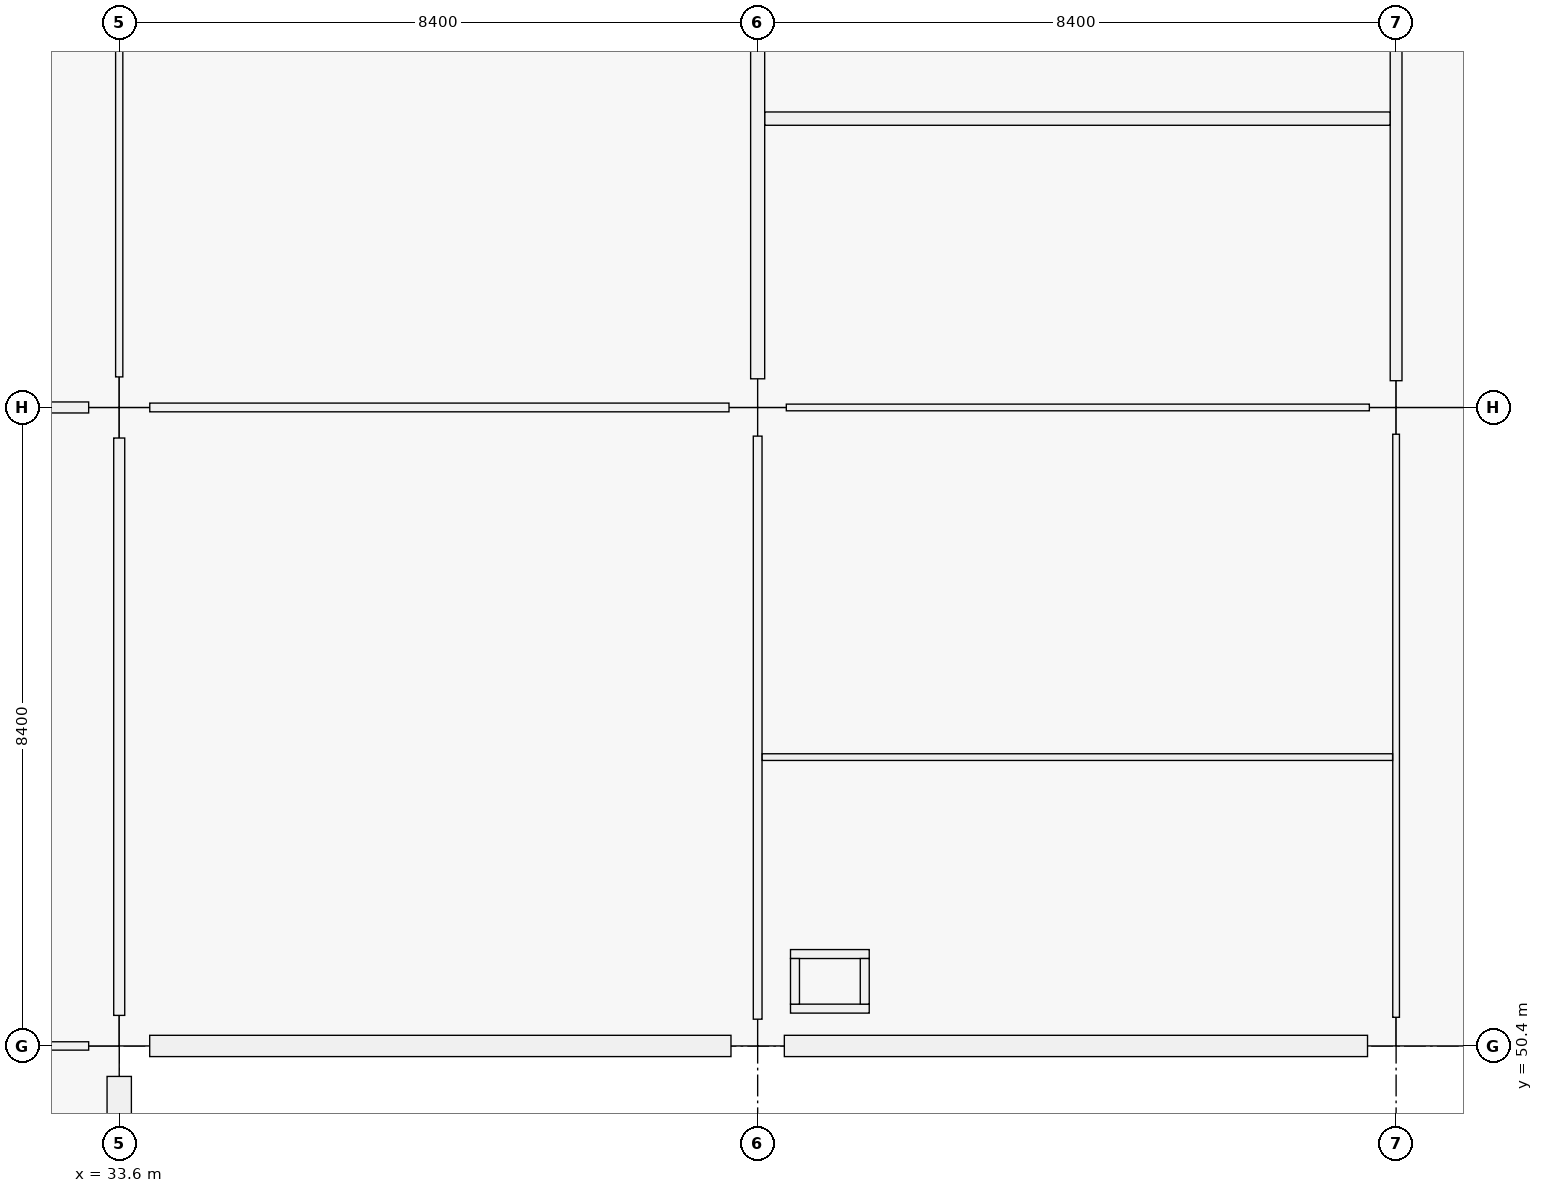
"""IFC4 building model, lengths in metres.
Left out: names, types, materials, properties, quantities, classifications, styles, units other than length and angle.
Written with IfcOpenShell. Run it as: python <this file> out.ifc"""

import sys

from ifc_helpers import new_model, si_unit, direction, frame, frame_2d, origin, origin_2d, place, context, subcontext, project, spatial, rectangle, extrude, element, fill, save


model = new_model("IFC4")
c1 = context("Model", 3, precision=1e-05, world=origin(), true_north=direction((0.0, 1.0)))
c2 = subcontext(c1, "Body", "Model", "MODEL_VIEW")
j1 = project(units=[si_unit("LENGTHUNIT", "METRE"), si_unit("PLANEANGLEUNIT", "RADIAN")], contexts=[c1])
p1 = place(None, origin())
s1 = spatial("IfcSite", under=j1, at=p1, CompositionType="ELEMENT")
p2 = place(p1, origin())
s2 = spatial("IfcBuilding", under=s1, at=p2, CompositionType="ELEMENT")
p3 = place(p2, frame((0.0, 0.0, 5.76)))
s3 = spatial("IfcBuildingStorey", under=s2, at=p3, CompositionType="ELEMENT", Elevation=5.76)
for number, where, z_axis, x_axis in (
    (1, (33.6, 50.4, 0.0), (0.0, 0.0, 1.0), (1.0, 0.0, 0.0)),
    (2, (33.6, 58.8, 0.0), (0.0, 0.0, 1.0), (1.0, 0.0, 0.0)),
):
    element("IfcColumn", number, at=place(p3, frame(where, z_axis=z_axis, x_axis=x_axis)), inside=s3, PredefinedType="COLUMN", context=c2, shape_type="SweptSolid", body=[
        extrude(rectangle(XDim=0.8, YDim=0.8, at=origin_2d()), origin(), (0.0, 0.0, 1.0), 4.5),
    ])
p4 = place(p3, frame((42.0, 50.4, 0.0), z_axis=(0.0, 0.0, 1.0), x_axis=(1.0, 0.0, 0.0)))
e3 = element("IfcColumn", 3, at=p4, inside=s3, PredefinedType="COLUMN", context=c2, shape_type="SweptSolid", body=[
    extrude(rectangle(XDim=0.7, YDim=0.7, at=origin_2d()), origin(), (0.0, 0.0, 1.0), 4.5),
])
for number, where, z_axis, x_axis in (
    (4, (42.0, 58.8, 0.0), (0.0, 0.0, 1.0), (1.0, 0.0, 0.0)),
    (5, (50.4, 50.4, 0.0), (0.0, 0.0, 1.0), (1.0, 0.0, 0.0)),
):
    element("IfcColumn", number, at=place(p3, frame(where, z_axis=z_axis, x_axis=x_axis)), inside=s3, PredefinedType="COLUMN", context=c2, shape_type="SweptSolid", body=[
        extrude(rectangle(XDim=0.75, YDim=0.75, at=origin_2d()), origin(), (0.0, 0.0, 1.0), 4.5),
    ])
p5 = place(p3, frame((50.4, 58.8, 0.0), z_axis=(0.0, 0.0, 1.0), x_axis=(1.0, 0.0, 0.0)))
e6 = element("IfcColumn", 6, at=p5, inside=s3, PredefinedType="COLUMN", context=c2, shape_type="SweptSolid", body=[
    extrude(rectangle(XDim=0.7, YDim=0.7, at=origin_2d()), origin(), (0.0, 0.0, 1.0), 4.5),
])
p6 = place(p3, frame((33.6, 49.999, 0.0), z_axis=(0.0, 0.0, 1.0), x_axis=(0.0, -1.0, 0.0)))
e7 = element("IfcWall", 7, at=p6, inside=s3, PredefinedType="SOLIDWALL", context=c2, shape_type="SweptSolid", body=[
    extrude(rectangle(XDim=7.598, YDim=0.32, at=frame_2d((3.799, 0.0))), origin(), (0.0, 0.0, 1.0), 3.4),
])
p7 = place(p6, frame((2.924, 0.0, 0.9)))
e8 = element("IfcOpeningElement", 8, at=p7, cuts=e7, PredefinedType="OPENING", context=c2, shape_type="SweptSolid", body=[
    extrude(rectangle(XDim=1.75, YDim=1.95, at=frame_2d((0.875, 0.975))), frame((0.0, 0.16, 0.0), z_axis=(0.0, -1.0, 0.0), x_axis=(1.0, 0.0, 0.0)), (0.0, 0.0, 1.0), 0.32),
])
p8 = place(p3, frame((41.649, 50.4, 0.0), z_axis=(0.0, 0.0, 1.0), x_axis=(-1.0, 0.0, 0.0)))
e9 = element("IfcWall", 9, at=p8, inside=s3, PredefinedType="SOLIDWALL", context=c2, shape_type="SweptSolid", body=[
    extrude(rectangle(XDim=7.648, YDim=0.28, at=frame_2d((3.824, 0.0))), origin(), (0.0, 0.0, 1.0), 3.4),
])
p9 = place(p3, frame((50.024, 50.4, 0.0), z_axis=(0.0, 0.0, 1.0), x_axis=(-1.0, 0.0, 0.0)))
e10 = element("IfcWall", 10, at=p9, inside=s3, PredefinedType="SOLIDWALL", context=c2, shape_type="SweptSolid", body=[
    extrude(rectangle(XDim=7.673, YDim=0.28, at=frame_2d((3.836, 0.0))), origin(), (0.0, 0.0, 1.0), 3.4),
])
p10 = place(p9, frame((2.462, 0.0, 0.9)))
e11 = element("IfcOpeningElement", 11, at=p10, cuts=e10, PredefinedType="OPENING", context=c2, shape_type="SweptSolid", body=[
    extrude(rectangle(XDim=2.75, YDim=1.6, at=frame_2d((1.375, 0.8))), frame((0.0, 0.14, 0.0), z_axis=(0.0, -1.0, 0.0), x_axis=(1.0, 0.0, 0.0)), (0.0, 0.0, 1.0), 0.28),
])
for number, where, z_axis, x_axis in (
    (12, (42.432, 50.891, 0.0), (0.0, 0.0, 1.0), (1.0, 0.0, 0.0)),
    (13, (42.432, 51.609, 0.0), (0.0, 0.0, 1.0), (1.0, 0.0, 0.0)),
):
    element("IfcWall", number, at=place(p3, frame(where, z_axis=z_axis, x_axis=x_axis)), inside=s3, PredefinedType="PARTITIONING", context=c2, shape_type="SweptSolid", body=[
        extrude(rectangle(XDim=1.036, YDim=0.118, at=frame_2d((0.518, 0.0))), origin(), (0.0, 0.0, 1.0), 3.48),
    ])
for number, where, z_axis, x_axis in (
    (14, (42.491, 50.95, 0.0), (0.0, 0.0, 1.0), (0.0, 1.0, 0.0)),
    (15, (43.409, 50.95, 0.0), (0.0, 0.0, 1.0), (0.0, 1.0, 0.0)),
):
    element("IfcWall", number, at=place(p3, frame(where, z_axis=z_axis, x_axis=x_axis)), inside=s3, PredefinedType="PARTITIONING", context=c2, shape_type="SweptSolid", body=[
        extrude(rectangle(XDim=0.6, YDim=0.118, at=frame_2d((0.3, 0.0))), origin(), (0.0, 0.0, 1.0), 3.48),
    ])
p11 = place(p3, frame((25.602, 50.4, 0.0), z_axis=(0.0, 0.0, 1.0), x_axis=(1.0, 0.0, 0.0)))
e16 = element("IfcWall", 16, at=p11, inside=s3, PredefinedType="MOVABLE", context=c2, shape_type="SweptSolid", body=[
    extrude(rectangle(XDim=7.596, YDim=0.11, at=frame_2d((3.798, 0.0))), origin(), (0.0, 0.0, 1.0), 2.4),
])
p12 = place(p11, frame((3.258, 0.0, 0.0)))
e17 = element("IfcOpeningElement", 17, at=p12, cuts=e16, PredefinedType="OPENING", context=c2, shape_type="SweptSolid", body=[
    extrude(rectangle(XDim=1.08, YDim=2.22, at=frame_2d((0.54, 1.11))), frame((0.0, 0.055, 0.0), z_axis=(0.0, -1.0, 0.0), x_axis=(1.0, 0.0, 0.0)), (0.0, 0.0, 1.0), 0.11),
])
p13 = place(p3, frame((25.602, 58.8, 0.0), z_axis=(0.0, 0.0, 1.0), x_axis=(1.0, 0.0, 0.0)))
e18 = element("IfcWall", 18, at=p13, inside=s3, PredefinedType="PARTITIONING", context=c2, shape_type="SweptSolid", body=[
    extrude(rectangle(XDim=7.596, YDim=0.145, at=frame_2d((3.798, 0.0))), origin(), (0.0, 0.0, 1.0), 2.4),
])
p14 = place(p13, frame((3.268, 0.0, 0.0)))
e19 = element("IfcOpeningElement", 19, at=p14, cuts=e18, PredefinedType="OPENING", context=c2, shape_type="SweptSolid", body=[
    extrude(rectangle(XDim=1.06, YDim=2.22, at=frame_2d((0.53, 1.11))), frame((0.0, 0.073, 0.0), z_axis=(0.0, -1.0, 0.0), x_axis=(1.0, 0.0, 0.0)), (0.0, 0.0, 1.0), 0.145),
])
p15 = place(p3, frame((34.002, 58.8, 0.0), z_axis=(0.0, 0.0, 1.0), x_axis=(1.0, 0.0, 0.0)))
e20 = element("IfcWall", 20, at=p15, inside=s3, PredefinedType="PARTITIONING", context=c2, shape_type="SweptSolid", body=[
    extrude(rectangle(XDim=7.621, YDim=0.115, at=frame_2d((3.811, 0.0))), origin(), (0.0, 0.0, 1.0), 2.4),
])
p16 = place(p15, frame((3.28, 0.0, 0.0)))
e21 = element("IfcOpeningElement", 21, at=p16, cuts=e20, PredefinedType="OPENING", context=c2, shape_type="SweptSolid", body=[
    extrude(rectangle(XDim=1.06, YDim=2.22, at=frame_2d((0.53, 1.11))), frame((0.0, 0.058, 0.0), z_axis=(0.0, -1.0, 0.0), x_axis=(1.0, 0.0, 0.0)), (0.0, 0.0, 1.0), 0.115),
])
p17 = place(p3, frame((42.377, 58.8, 0.0), z_axis=(0.0, 0.0, 1.0), x_axis=(1.0, 0.0, 0.0)))
e22 = element("IfcWall", 22, at=p17, inside=s3, PredefinedType="PARTITIONING", context=c2, shape_type="SweptSolid", body=[
    extrude(rectangle(XDim=7.671, YDim=0.088, at=frame_2d((3.835, 0.0))), origin(), (0.0, 0.0, 1.0), 2.4),
])
p18 = place(p3, frame((33.6, 50.802, 0.0), z_axis=(0.0, 0.0, 1.0), x_axis=(0.0, 1.0, 0.0)))
e23 = element("IfcWall", 23, at=p18, inside=s3, PredefinedType="PARTITIONING", context=c2, shape_type="SweptSolid", body=[
    extrude(rectangle(XDim=7.596, YDim=0.145, at=frame_2d((3.798, 0.0))), origin(), (0.0, 0.0, 1.0), 2.4),
])
p19 = place(p18, frame((3.318, 0.0, 0.0)))
e24 = element("IfcOpeningElement", 24, at=p19, cuts=e23, PredefinedType="OPENING", context=c2, shape_type="SweptSolid", body=[
    extrude(rectangle(XDim=0.96, YDim=2.18, at=frame_2d((0.48, 1.09))), frame((0.0, 0.073, 0.0), z_axis=(0.0, -1.0, 0.0), x_axis=(1.0, 0.0, 0.0)), (0.0, 0.0, 1.0), 0.145),
])
p20 = place(p3, frame((33.6, 59.202, 0.0), z_axis=(0.0, 0.0, 1.0), x_axis=(0.0, 1.0, 0.0)))
e25 = element("IfcWall", 25, at=p20, inside=s3, PredefinedType="PARTITIONING", context=c2, shape_type="SweptSolid", body=[
    extrude(rectangle(XDim=7.596, YDim=0.095, at=frame_2d((3.798, 0.0))), origin(), (0.0, 0.0, 1.0), 2.4),
])
p21 = place(p20, frame((3.308, 0.0, 0.0)))
e26 = element("IfcOpeningElement", 26, at=p21, cuts=e25, PredefinedType="OPENING", context=c2, shape_type="SweptSolid", body=[
    extrude(rectangle(XDim=0.98, YDim=2.18, at=frame_2d((0.49, 1.09))), frame((0.0, 0.047, 0.0), z_axis=(0.0, -1.0, 0.0), x_axis=(1.0, 0.0, 0.0)), (0.0, 0.0, 1.0), 0.095),
])
p22 = place(p3, frame((42.0, 50.752, 0.0), z_axis=(0.0, 0.0, 1.0), x_axis=(0.0, 1.0, 0.0)))
e27 = element("IfcWall", 27, at=p22, inside=s3, PredefinedType="PARTITIONING", context=c2, shape_type="SweptSolid", body=[
    extrude(rectangle(XDim=7.671, YDim=0.115, at=frame_2d((3.835, 0.0))), origin(), (0.0, 0.0, 1.0), 2.4),
])
p23 = place(p3, frame((42.0, 59.177, 0.0), z_axis=(0.0, 0.0, 1.0), x_axis=(0.0, 1.0, 0.0)))
e28 = element("IfcWall", 28, at=p23, inside=s3, PredefinedType="PARTITIONING", context=c2, shape_type="SweptSolid", body=[
    extrude(rectangle(XDim=7.621, YDim=0.185, at=frame_2d((3.811, 0.0))), origin(), (0.0, 0.0, 1.0), 2.4),
])
p24 = place(p3, frame((50.4, 50.777, 0.0), z_axis=(0.0, 0.0, 1.0), x_axis=(0.0, 1.0, 0.0)))
e29 = element("IfcWall", 29, at=p24, inside=s3, PredefinedType="PARTITIONING", context=c2, shape_type="SweptSolid", body=[
    extrude(rectangle(XDim=7.671, YDim=0.088, at=frame_2d((3.835, 0.0))), origin(), (0.0, 0.0, 1.0), 2.4),
])
p25 = place(p24, frame((1.193, 0.0, 0.0)))
e30 = element("IfcOpeningElement", 30, at=p25, cuts=e29, PredefinedType="OPENING", context=c2, shape_type="SweptSolid", body=[
    extrude(rectangle(XDim=0.94, YDim=2.15, at=frame_2d((0.47, 1.075))), frame((0.0, 0.044, 0.0), z_axis=(0.0, -1.0, 0.0), x_axis=(1.0, 0.0, 0.0)), (0.0, 0.0, 1.0), 0.088),
])
p26 = place(p24, frame((5.123, 0.0, 0.0)))
e31 = element("IfcOpeningElement", 31, at=p26, cuts=e29, PredefinedType="OPENING", context=c2, shape_type="SweptSolid", body=[
    extrude(rectangle(XDim=0.92, YDim=2.15, at=frame_2d((0.46, 1.075))), frame((0.0, 0.044, 0.0), z_axis=(0.0, -1.0, 0.0), x_axis=(1.0, 0.0, 0.0)), (0.0, 0.0, 1.0), 0.088),
])
p27 = place(p3, frame((50.4, 59.152, 0.0), z_axis=(0.0, 0.0, 1.0), x_axis=(0.0, 1.0, 0.0)))
e32 = element("IfcWall", 32, at=p27, inside=s3, PredefinedType="PARTITIONING", context=c2, shape_type="SweptSolid", body=[
    extrude(rectangle(XDim=7.646, YDim=0.155, at=frame_2d((3.823, 0.0))), origin(), (0.0, 0.0, 1.0), 2.4),
])
p28 = place(p27, frame((1.163, 0.0, 0.0)))
e33 = element("IfcOpeningElement", 33, at=p28, cuts=e32, PredefinedType="OPENING", context=c2, shape_type="SweptSolid", body=[
    extrude(rectangle(XDim=1.05, YDim=2.12, at=frame_2d((0.525, 1.06))), frame((0.0, 0.078, 0.0), z_axis=(0.0, -1.0, 0.0), x_axis=(1.0, 0.0, 0.0)), (0.0, 0.0, 1.0), 0.155),
])
p29 = place(p27, frame((5.103, 0.0, 0.0)))
e34 = element("IfcOpeningElement", 34, at=p29, cuts=e32, PredefinedType="OPENING", context=c2, shape_type="SweptSolid", body=[
    extrude(rectangle(XDim=1.01, YDim=2.12, at=frame_2d((0.505, 1.06))), frame((0.0, 0.078, 0.0), z_axis=(0.0, -1.0, 0.0), x_axis=(1.0, 0.0, 0.0)), (0.0, 0.0, 1.0), 0.155),
])
p30 = place(p3, frame((42.06, 54.2, 0.0), z_axis=(0.0, 0.0, 1.0), x_axis=(1.0, 0.0, 0.0)))
e35 = element("IfcWall", 35, at=p30, inside=s3, PredefinedType="PARTITIONING", context=c2, shape_type="SweptSolid", body=[
    extrude(rectangle(XDim=8.294, YDim=0.088, at=frame_2d((4.147, 0.0))), origin(), (0.0, 0.0, 1.0), 2.4),
])
p31 = place(p3, frame((42.094, 62.6, 0.0), z_axis=(0.0, 0.0, 1.0), x_axis=(1.0, 0.0, 0.0)))
e36 = element("IfcWall", 36, at=p31, inside=s3, PredefinedType="PARTITIONING", context=c2, shape_type="SweptSolid", body=[
    extrude(rectangle(XDim=8.226, YDim=0.175, at=frame_2d((4.113, 0.0))), origin(), (0.0, 0.0, 1.0), 2.4),
])
p32 = place(p10, origin())
e37 = element("IfcWindow", 37, at=p32, inside=s3, PartitioningType="SINGLE_PANEL", PredefinedType="WINDOW", context=c2, shape_type="SweptSolid", body=[
    extrude(rectangle(XDim=2.75, YDim=1.6, at=frame_2d((1.375, 0.8))), frame((0.0, 0.03, 0.0), z_axis=(0.0, -1.0, 0.0), x_axis=(1.0, 0.0, 0.0)), (0.0, 0.0, 1.0), 0.06),
])
fill(e11, e37)
p33 = place(p25, origin())
e38 = element("IfcDoor", 38, at=p33, inside=s3, OperationType="SINGLE_SWING_RIGHT", PredefinedType="DOOR", context=c2, shape_type="SweptSolid", body=[
    extrude(rectangle(XDim=0.94, YDim=2.15, at=frame_2d((0.47, 1.075))), frame((0.0, 0.025, 0.0), z_axis=(0.0, -1.0, 0.0), x_axis=(1.0, 0.0, 0.0)), (0.0, 0.0, 1.0), 0.05),
])
fill(e30, e38)
p34 = place(p26, origin())
e39 = element("IfcDoor", 39, at=p34, inside=s3, OperationType="SINGLE_SWING_LEFT", PredefinedType="DOOR", context=c2, shape_type="SweptSolid", body=[
    extrude(rectangle(XDim=0.92, YDim=2.15, at=frame_2d((0.46, 1.075))), frame((0.0, 0.025, 0.0), z_axis=(0.0, -1.0, 0.0), x_axis=(1.0, 0.0, 0.0)), (0.0, 0.0, 1.0), 0.05),
])
fill(e31, e39)
p35 = place(p28, origin())
e40 = element("IfcDoor", 40, at=p35, inside=s3, OperationType="SINGLE_SWING_RIGHT", PredefinedType="DOOR", context=c2, shape_type="SweptSolid", body=[
    extrude(rectangle(XDim=1.05, YDim=2.12, at=frame_2d((0.525, 1.06))), frame((0.0, 0.025, 0.0), z_axis=(0.0, -1.0, 0.0), x_axis=(1.0, 0.0, 0.0)), (0.0, 0.0, 1.0), 0.05),
])
fill(e33, e40)
p36 = place(p16, origin())
e41 = element("IfcDoor", 41, at=p36, inside=s3, OperationType="SINGLE_SWING_LEFT", PredefinedType="DOOR", context=c2, shape_type="SweptSolid", body=[
    extrude(rectangle(XDim=1.06, YDim=2.22, at=frame_2d((0.53, 1.11))), frame((0.0, 0.025, 0.0), z_axis=(0.0, -1.0, 0.0), x_axis=(1.0, 0.0, 0.0)), (0.0, 0.0, 1.0), 0.05),
])
fill(e21, e41)
p37 = place(p19, origin())
e42 = element("IfcDoor", 42, at=p37, inside=s3, OperationType="SINGLE_SWING_RIGHT", PredefinedType="DOOR", context=c2, shape_type="SweptSolid", body=[
    extrude(rectangle(XDim=0.96, YDim=2.18, at=frame_2d((0.48, 1.09))), frame((0.0, 0.025, 0.0), z_axis=(0.0, -1.0, 0.0), x_axis=(1.0, 0.0, 0.0)), (0.0, 0.0, 1.0), 0.05),
])
fill(e24, e42)
p38 = place(p21, origin())
e43 = element("IfcDoor", 43, at=p38, inside=s3, OperationType="SINGLE_SWING_LEFT", PredefinedType="DOOR", context=c2, shape_type="SweptSolid", body=[
    extrude(rectangle(XDim=0.98, YDim=2.18, at=frame_2d((0.49, 1.09))), frame((0.0, 0.025, 0.0), z_axis=(0.0, -1.0, 0.0), x_axis=(1.0, 0.0, 0.0)), (0.0, 0.0, 1.0), 0.05),
])
fill(e26, e43)
save(model, sys.argv[1])
